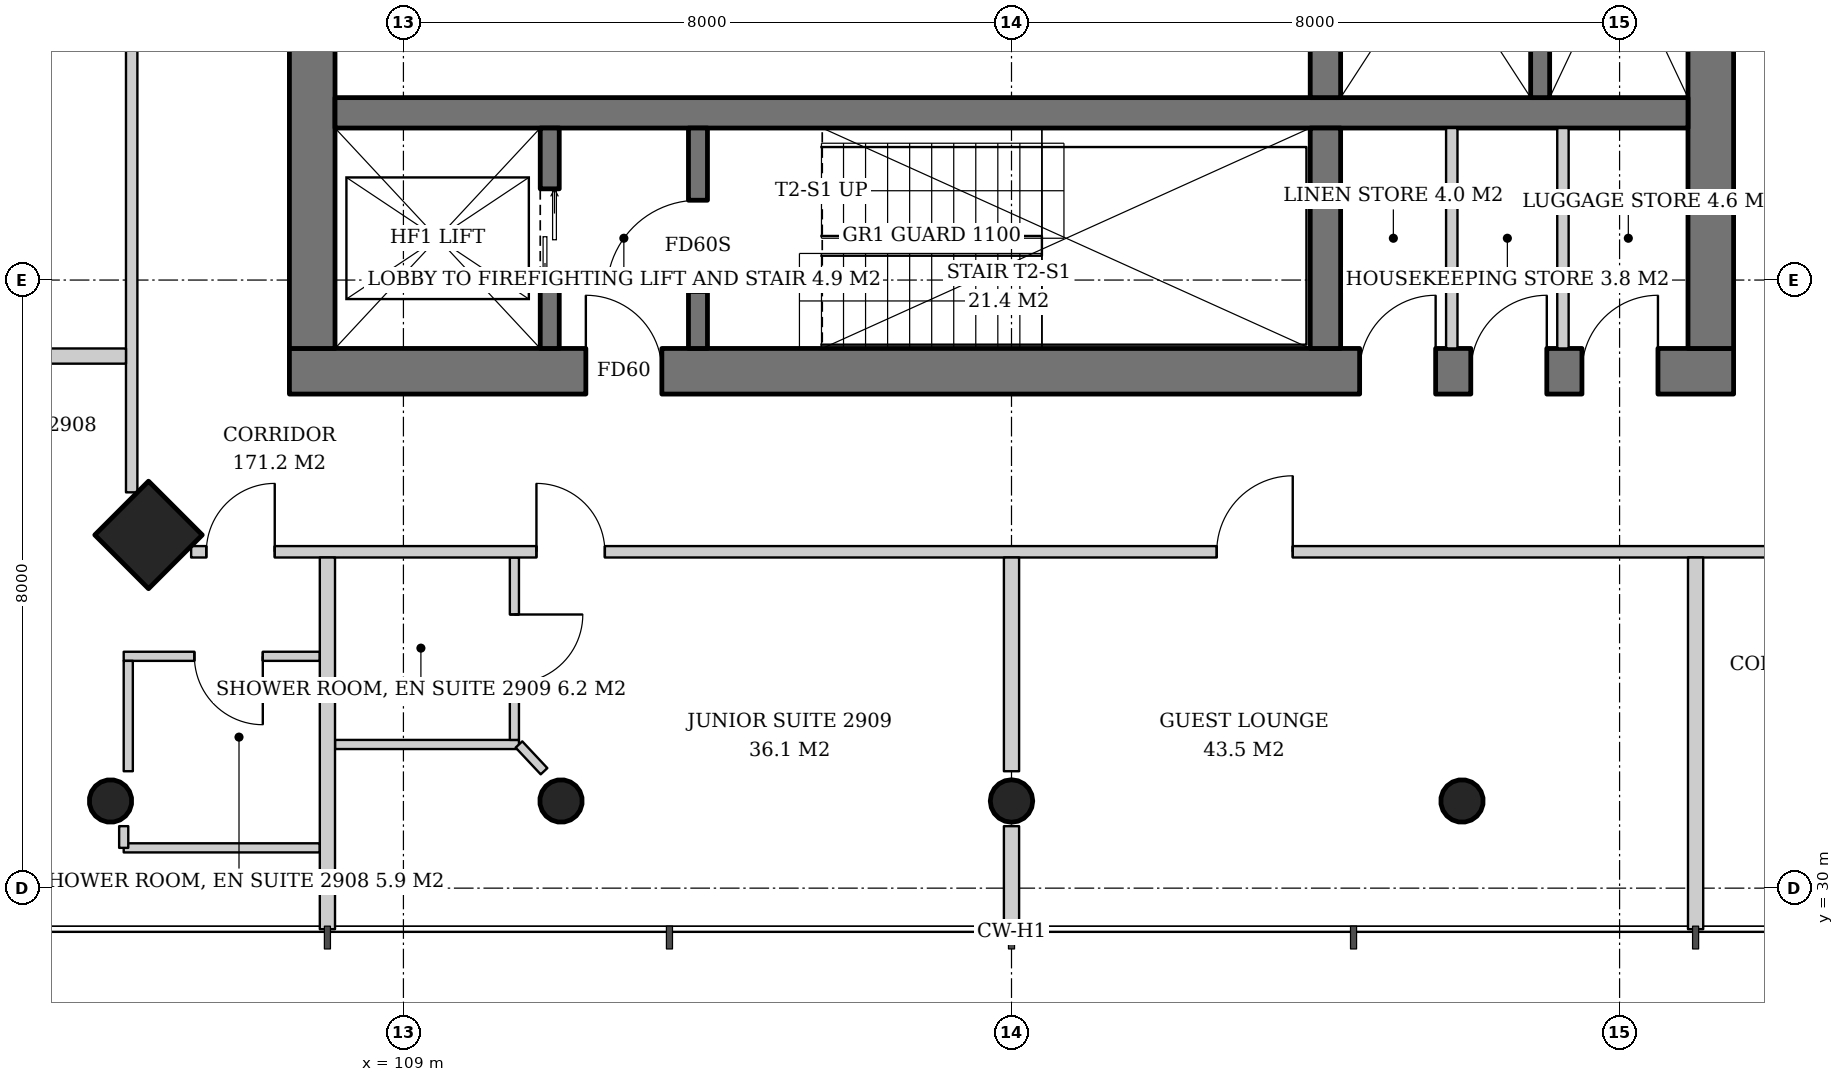
"""IFC4 building model, lengths in metres.
Left out: names, types, materials, properties, quantities, classifications, styles, units other than length and angle.
Written with IfcOpenShell. Run it as: python <this file> out.ifc"""

import sys

from ifc_helpers import new_model, si_unit, direction, frame, frame_2d, origin, origin_2d, place, context, subcontext, project, spatial, rectangle, hollow_circle, extrude, element, fill, save


model = new_model("IFC4")
c1 = context("Model", 3, precision=1e-05, world=origin(), true_north=direction((0.0, 1.0)))
c2 = subcontext(c1, "Body", "Model", "MODEL_VIEW")
j1 = project(units=[si_unit("LENGTHUNIT", "METRE"), si_unit("PLANEANGLEUNIT", "RADIAN")], contexts=[c1])
p1 = place(None, origin())
s1 = spatial("IfcSite", under=j1, at=p1, CompositionType="ELEMENT")
p2 = place(p1, origin())
s2 = spatial("IfcBuilding", under=s1, at=p2, CompositionType="ELEMENT")
p3 = place(p2, frame((0.0, 0.0, 116.0)))
s3 = spatial("IfcBuildingStorey", under=s2, at=p3, CompositionType="ELEMENT", Elevation=116.0)
p4 = place(p3, frame((105.595, 34.595, 0.0), z_axis=(0.043029647111, 0.043029647111, 0.998146732169), x_axis=(-0.707106781187, 0.707106781187, 0.0)))
e1 = element("IfcColumn", 1, at=p4, inside=s3, PredefinedType="COLUMN", context=c2, shape_type="SweptSolid", body=[
    extrude(rectangle(XDim=1.0, YDim=1.0, at=origin_2d()), origin(), (0.0, 0.0, 1.0), 3.807),
])
p5 = place(p3, frame((105.095, 31.095, 0.0), z_axis=(0.043029647111, 0.043029647111, 0.998146732169), x_axis=(-0.707106781187, 0.707106781187, 0.0)))
e2 = element("IfcColumn", 2, at=p5, inside=s3, PredefinedType="COLUMN", context=c2, shape_type="SweptSolid", body=[
    extrude(hollow_circle(Radius=0.28, WallThickness=0.02, at=origin_2d()), origin(), (0.0, 0.0, 1.0), 3.807),
])
p6 = place(p3, frame((111.047, 31.095, 0.0), z_axis=(0.021561848751, 0.043059525333, 0.998839808957), x_axis=(-0.894160516368, 0.44774654769, 0.0)))
e3 = element("IfcColumn", 3, at=p6, inside=s3, PredefinedType="COLUMN", context=c2, shape_type="SweptSolid", body=[
    extrude(hollow_circle(Radius=0.28, WallThickness=0.02, at=origin_2d()), origin(), (0.0, 0.0, 1.0), 3.804),
])
p7 = place(p3, frame((117.0, 31.095, 0.0), z_axis=(0.0, 0.043069538298, 0.999072076915), x_axis=(-1.0, 0.0, 0.0)))
e4 = element("IfcColumn", 4, at=p7, inside=s3, PredefinedType="COLUMN", context=c2, shape_type="SweptSolid", body=[
    extrude(hollow_circle(Radius=0.28, WallThickness=0.02, at=origin_2d()), origin(), (0.0, 0.0, 1.0), 3.803),
])
p8 = place(p3, frame((122.953, 31.095, 0.0), z_axis=(-0.021561848751, 0.043059525333, 0.998839808957), x_axis=(-0.894160516368, -0.44774654769, 0.0)))
e5 = element("IfcColumn", 5, at=p8, inside=s3, PredefinedType="COLUMN", context=c2, shape_type="SweptSolid", body=[
    extrude(hollow_circle(Radius=0.28, WallThickness=0.02, at=origin_2d()), origin(), (0.0, 0.0, 1.0), 3.804),
])
p9 = place(p3, frame((107.5, 36.8, 0.0), z_axis=(0.0, 0.0, 1.0), x_axis=(1.0, 0.0, 0.0)))
e6 = element("IfcWall", 6, at=p9, inside=s3, PredefinedType="SHEAR", context=c2, shape_type="SweptSolid", body=[
    extrude(rectangle(XDim=19.0, YDim=0.6, at=frame_2d((9.5, 0.0))), origin(), (0.0, 0.0, 1.0), 3.8),
])
p10 = place(p9, frame((3.9, 0.0, 0.0)))
e7 = element("IfcOpeningElement", 7, at=p10, cuts=e6, PredefinedType="OPENING", context=c2, shape_type="SweptSolid", body=[
    extrude(rectangle(XDim=1.0, YDim=2.1, at=frame_2d((0.5, 1.05))), frame((0.0, 0.31, 0.0), z_axis=(0.0, -1.0, 0.0), x_axis=(1.0, 0.0, 0.0)), (0.0, 0.0, 1.0), 0.62),
])
p11 = place(p9, frame((14.08, 0.0, 0.0)))
e8 = element("IfcOpeningElement", 8, at=p11, cuts=e6, PredefinedType="OPENING", context=c2, shape_type="SweptSolid", body=[
    extrude(rectangle(XDim=1.0, YDim=2.1, at=frame_2d((0.5, 1.05))), frame((0.0, 0.31, 0.0), z_axis=(0.0, -1.0, 0.0), x_axis=(1.0, 0.0, 0.0)), (0.0, 0.0, 1.0), 0.62),
])
p12 = place(p9, frame((15.542, 0.0, 0.0)))
e9 = element("IfcOpeningElement", 9, at=p12, cuts=e6, PredefinedType="OPENING", context=c2, shape_type="SweptSolid", body=[
    extrude(rectangle(XDim=1.0, YDim=2.1, at=frame_2d((0.5, 1.05))), frame((0.0, 0.31, 0.0), z_axis=(0.0, -1.0, 0.0), x_axis=(1.0, 0.0, 0.0)), (0.0, 0.0, 1.0), 0.62),
])
p13 = place(p9, frame((17.005, 0.0, 0.0)))
e10 = element("IfcOpeningElement", 10, at=p13, cuts=e6, PredefinedType="OPENING", context=c2, shape_type="SweptSolid", body=[
    extrude(rectangle(XDim=1.0, YDim=2.1, at=frame_2d((0.5, 1.05))), frame((0.0, 0.31, 0.0), z_axis=(0.0, -1.0, 0.0), x_axis=(1.0, 0.0, 0.0)), (0.0, 0.0, 1.0), 0.62),
])
p14 = place(p3, frame((107.8, 37.1, 0.0), z_axis=(0.0, 0.0, 1.0), x_axis=(0.0, 1.0, 0.0)))
e11 = element("IfcWall", 11, at=p14, inside=s3, PredefinedType="SHEAR", context=c2, shape_type="SweptSolid", body=[
    extrude(rectangle(XDim=17.8, YDim=0.6, at=frame_2d((8.9, 0.0))), origin(), (0.0, 0.0, 1.0), 3.8),
])
p15 = place(p14, frame((8.0, 0.0, 0.0)))
e12 = element("IfcOpeningElement", 12, at=p15, cuts=e11, PredefinedType="OPENING", context=c2, shape_type="SweptSolid", body=[
    extrude(rectangle(XDim=1.8, YDim=2.4, at=frame_2d((0.9, 1.2))), frame((0.0, 0.31, 0.0), z_axis=(0.0, -1.0, 0.0), x_axis=(1.0, 0.0, 0.0)), (0.0, 0.0, 1.0), 0.62),
])
p16 = place(p3, frame((126.2, 37.1, 0.0), z_axis=(0.0, 0.0, 1.0), x_axis=(0.0, 1.0, 0.0)))
e13 = element("IfcWall", 13, at=p16, inside=s3, PredefinedType="SHEAR", context=c2, shape_type="SweptSolid", body=[
    extrude(rectangle(XDim=17.8, YDim=0.6, at=frame_2d((8.9, 0.0))), origin(), (0.0, 0.0, 1.0), 3.8),
])
p17 = place(p16, frame((8.0, 0.0, 0.0)))
e14 = element("IfcOpeningElement", 14, at=p17, cuts=e13, PredefinedType="OPENING", context=c2, shape_type="SweptSolid", body=[
    extrude(rectangle(XDim=1.8, YDim=2.4, at=frame_2d((0.9, 1.2))), frame((0.0, 0.31, 0.0), z_axis=(0.0, -1.0, 0.0), x_axis=(1.0, 0.0, 0.0)), (0.0, 0.0, 1.0), 0.62),
])
p18 = place(p3, frame((108.1, 40.2, 0.0), z_axis=(0.0, 0.0, 1.0), x_axis=(1.0, 0.0, 0.0)))
e15 = element("IfcWall", 15, at=p18, inside=s3, PredefinedType="SHEAR", context=c2, shape_type="SweptSolid", body=[
    extrude(rectangle(XDim=17.8, YDim=0.4, at=frame_2d((8.9, 0.0))), origin(), (0.0, 0.0, 1.0), 3.8),
])
p19 = place(p3, frame((121.13, 37.1, 0.0), z_axis=(0.0, 0.0, 1.0), x_axis=(0.0, 1.0, 0.0)))
e16 = element("IfcWall", 16, at=p19, inside=s3, PredefinedType="SHEAR", context=c2, shape_type="SweptSolid", body=[
    extrude(rectangle(XDim=2.9, YDim=0.4, at=frame_2d((1.45, 0.0))), origin(), (0.0, 0.0, 1.0), 3.8),
])
p20 = place(p3, frame((121.13, 40.4, 0.0), z_axis=(0.0, 0.0, 1.0), x_axis=(0.0, 1.0, 0.0)))
e17 = element("IfcWall", 17, at=p20, inside=s3, PredefinedType="SHEAR", context=c2, shape_type="SweptSolid", body=[
    extrude(rectangle(XDim=11.2, YDim=0.4, at=frame_2d((5.6, 0.0))), origin(), (0.0, 0.0, 1.0), 3.8),
])
p21 = place(p3, frame((110.925, 37.1, 0.0), z_axis=(0.0, 0.0, 1.0), x_axis=(0.0, 1.0, 0.0)))
e18 = element("IfcWall", 18, at=p21, inside=s3, PredefinedType="SHEAR", context=c2, shape_type="SweptSolid", body=[
    extrude(rectangle(XDim=2.9, YDim=0.25, at=frame_2d((1.45, 0.0))), origin(), (0.0, 0.0, 1.0), 3.8),
])
p22 = place(p21, frame((0.8, 0.0, 0.0)))
e19 = element("IfcOpeningElement", 19, at=p22, cuts=e18, PredefinedType="OPENING", context=c2, shape_type="SweptSolid", body=[
    extrude(rectangle(XDim=1.3, YDim=2.2, at=frame_2d((0.65, 1.1))), frame((0.0, 0.135, 0.0), z_axis=(0.0, -1.0, 0.0), x_axis=(1.0, 0.0, 0.0)), (0.0, 0.0, 1.0), 0.27),
])
p23 = place(p3, frame((112.875, 37.1, 0.0), z_axis=(0.0, 0.0, 1.0), x_axis=(0.0, 1.0, 0.0)))
e20 = element("IfcWall", 20, at=p23, inside=s3, PredefinedType="SHEAR", context=c2, shape_type="SweptSolid", body=[
    extrude(rectangle(XDim=2.9, YDim=0.25, at=frame_2d((1.45, 0.0))), origin(), (0.0, 0.0, 1.0), 3.8),
])
p24 = place(p23, frame((0.75, 0.0, 0.0)))
e21 = element("IfcOpeningElement", 21, at=p24, cuts=e20, PredefinedType="OPENING", context=c2, shape_type="SweptSolid", body=[
    extrude(rectangle(XDim=1.2, YDim=2.1, at=frame_2d((0.6, 1.05))), frame((0.0, 0.135, 0.0), z_axis=(0.0, -1.0, 0.0), x_axis=(1.0, 0.0, 0.0)), (0.0, 0.0, 1.0), 0.27),
])
p25 = place(p3, frame((123.955, 44.25, 0.0), z_axis=(0.0, 0.0, 1.0), x_axis=(0.0, -1.0, 0.0)))
e22 = element("IfcWall", 22, at=p25, inside=s3, PredefinedType="SHEAR", context=c2, shape_type="SweptSolid", body=[
    extrude(rectangle(XDim=3.85, YDim=0.25, at=frame_2d((1.925, 0.0))), origin(), (0.0, 0.0, 1.0), 3.8),
])
for number, where, z_axis, x_axis in (
    (23, (122.792, 37.1, 0.0), (0.0, 0.0, 1.0), (0.0, 1.0, 0.0)),
    (24, (124.255, 37.1, 0.0), (0.0, 0.0, 1.0), (0.0, 1.0, 0.0)),
):
    element("IfcWall", number, at=place(p3, frame(where, z_axis=z_axis, x_axis=x_axis)), inside=s3, PredefinedType="SOLIDWALL", context=c2, shape_type="SweptSolid", body=[
        extrude(rectangle(XDim=2.9, YDim=0.15, at=frame_2d((1.45, 0.0))), origin(), (0.0, 0.0, 1.0), 3.6),
    ])
p26 = place(p3, frame((105.425, 56.793, 0.0), z_axis=(0.0, 0.0, 1.0), x_axis=(0.0, -1.0, 0.0)))
e25 = element("IfcWall", 25, at=p26, inside=s3, PredefinedType="PARTITIONING", context=c2, shape_type="SweptSolid", body=[
    extrude(rectangle(XDim=21.586, YDim=0.15, at=frame_2d((10.793, 0.0))), origin(), (0.0, 0.0, 1.0), 2.9),
])
p27 = place(p26, frame((0.2, 0.0, 0.0)))
e26 = element("IfcOpeningElement", 26, at=p27, cuts=e25, PredefinedType="OPENING", context=c2, shape_type="SweptSolid", body=[
    extrude(rectangle(XDim=0.9, YDim=2.1, at=frame_2d((0.45, 1.05))), frame((0.0, 0.085, 0.0), z_axis=(0.0, -1.0, 0.0), x_axis=(1.0, 0.0, 0.0)), (0.0, 0.0, 1.0), 0.17),
])
p28 = place(p26, frame((4.543, 0.0, 0.0)))
e27 = element("IfcOpeningElement", 27, at=p28, cuts=e25, PredefinedType="OPENING", context=c2, shape_type="SweptSolid", body=[
    extrude(rectangle(XDim=0.9, YDim=2.1, at=frame_2d((0.45, 1.05))), frame((0.0, 0.085, 0.0), z_axis=(0.0, -1.0, 0.0), x_axis=(1.0, 0.0, 0.0)), (0.0, 0.0, 1.0), 0.17),
])
p29 = place(p26, frame((13.543, 0.0, 0.0)))
e28 = element("IfcOpeningElement", 28, at=p29, cuts=e25, PredefinedType="OPENING", context=c2, shape_type="SweptSolid", body=[
    extrude(rectangle(XDim=0.9, YDim=2.1, at=frame_2d((0.45, 1.05))), frame((0.0, 0.085, 0.0), z_axis=(0.0, -1.0, 0.0), x_axis=(1.0, 0.0, 0.0)), (0.0, 0.0, 1.0), 0.17),
])
p30 = place(p3, frame((105.35, 37.0, 0.0), z_axis=(0.0, 0.0, 1.0), x_axis=(-1.0, 0.0, 0.0)))
e29 = element("IfcWall", 29, at=p30, inside=s3, PredefinedType="PARTITIONING", context=c2, shape_type="SweptSolid", body=[
    extrude(rectangle(XDim=4.89, YDim=0.2, at=frame_2d((2.445, 0.0))), origin(), (0.0, 0.0, 1.0), 3.2),
])
p31 = place(p3, frame((107.9, 33.05, 0.0), z_axis=(0.0, 0.0, 1.0), x_axis=(-1.0, 0.0, 0.0)))
e30 = element("IfcWall", 30, at=p31, inside=s3, PredefinedType="PARTITIONING", context=c2, shape_type="SweptSolid", body=[
    extrude(rectangle(XDim=2.58, YDim=0.12, at=frame_2d((1.29, 0.0))), origin(), (0.0, 0.0, 1.0), 2.9),
])
p32 = place(p31, frame((0.75, 0.0, 0.0)))
e31 = element("IfcOpeningElement", 31, at=p32, cuts=e30, PredefinedType="OPENING", context=c2, shape_type="SweptSolid", body=[
    extrude(rectangle(XDim=0.9, YDim=2.1, at=frame_2d((0.45, 1.05))), frame((0.0, 0.07, 0.0), z_axis=(0.0, -1.0, 0.0), x_axis=(1.0, 0.0, 0.0)), (0.0, 0.0, 1.0), 0.14),
])
p33 = place(p3, frame((107.9, 30.53, 0.0), z_axis=(0.0, 0.0, 1.0), x_axis=(-1.0, 0.0, 0.0)))
e32 = element("IfcWall", 32, at=p33, inside=s3, PredefinedType="PARTITIONING", context=c2, shape_type="SweptSolid", body=[
    extrude(rectangle(XDim=2.58, YDim=0.12, at=frame_2d((1.29, 0.0))), origin(), (0.0, 0.0, 1.0), 3.6),
])
p34 = place(p3, frame((105.38, 32.99, 0.0), z_axis=(0.0, 0.0, 1.0), x_axis=(0.0, -1.0, 0.0)))
e33 = element("IfcWall", 33, at=p34, inside=s3, PredefinedType="PARTITIONING", context=c2, shape_type="SweptSolid", body=[
    extrude(rectangle(XDim=1.452, YDim=0.12, at=frame_2d((0.726, 0.0))), origin(), (0.0, 0.0, 1.0), 3.2),
])
p35 = place(p3, frame((108.1, 31.89, 0.0), z_axis=(0.0, 0.0, 1.0), x_axis=(1.0, 0.0, 0.0)))
e34 = element("IfcWall", 34, at=p35, inside=s3, PredefinedType="PARTITIONING", context=c2, shape_type="SweptSolid", body=[
    extrude(rectangle(XDim=2.42, YDim=0.12, at=frame_2d((1.21, 0.0))), origin(), (0.0, 0.0, 1.0), 3.6),
])
p36 = place(p3, frame((110.46, 34.35, 0.0), z_axis=(0.0, 0.0, 1.0), x_axis=(0.0, -1.0, 0.0)))
e35 = element("IfcWall", 35, at=p36, inside=s3, PredefinedType="PARTITIONING", context=c2, shape_type="SweptSolid", body=[
    extrude(rectangle(XDim=2.4, YDim=0.12, at=frame_2d((1.2, 0.0))), origin(), (0.0, 0.0, 1.0), 3.6),
])
p37 = place(p36, frame((0.75, 0.0, 0.0)))
e36 = element("IfcOpeningElement", 36, at=p37, cuts=e35, PredefinedType="OPENING", context=c2, shape_type="SweptSolid", body=[
    extrude(rectangle(XDim=0.9, YDim=2.1, at=frame_2d((0.45, 1.05))), frame((0.0, 0.07, 0.0), z_axis=(0.0, -1.0, 0.0), x_axis=(1.0, 0.0, 0.0)), (0.0, 0.0, 1.0), 0.14),
])
p38 = place(p3, frame((106.207, 34.425, 0.0), z_axis=(0.0, 0.0, 1.0), x_axis=(1.0, 0.0, 0.0)))
e37 = element("IfcWall", 37, at=p38, inside=s3, PredefinedType="PARTITIONING", context=c2, shape_type="SweptSolid", body=[
    extrude(rectangle(XDim=21.586, YDim=0.15, at=frame_2d((10.793, 0.0))), origin(), (0.0, 0.0, 1.0), 2.9),
])
p39 = place(p38, frame((0.2, 0.0, 0.0)))
e38 = element("IfcOpeningElement", 38, at=p39, cuts=e37, PredefinedType="OPENING", context=c2, shape_type="SweptSolid", body=[
    extrude(rectangle(XDim=0.9, YDim=2.1, at=frame_2d((0.45, 1.05))), frame((0.0, 0.085, 0.0), z_axis=(0.0, -1.0, 0.0), x_axis=(1.0, 0.0, 0.0)), (0.0, 0.0, 1.0), 0.17),
])
p40 = place(p38, frame((4.543, 0.0, 0.0)))
e39 = element("IfcOpeningElement", 39, at=p40, cuts=e37, PredefinedType="OPENING", context=c2, shape_type="SweptSolid", body=[
    extrude(rectangle(XDim=0.9, YDim=2.1, at=frame_2d((0.45, 1.05))), frame((0.0, 0.085, 0.0), z_axis=(0.0, -1.0, 0.0), x_axis=(1.0, 0.0, 0.0)), (0.0, 0.0, 1.0), 0.17),
])
p41 = place(p38, frame((13.493, 0.0, 0.0)))
e40 = element("IfcOpeningElement", 40, at=p41, cuts=e37, PredefinedType="OPENING", context=c2, shape_type="SweptSolid", body=[
    extrude(rectangle(XDim=1.0, YDim=2.1, at=frame_2d((0.5, 1.05))), frame((0.0, 0.085, 0.0), z_axis=(0.0, -1.0, 0.0), x_axis=(1.0, 0.0, 0.0)), (0.0, 0.0, 1.0), 0.17),
])
p42 = place(p3, frame((108.0, 34.35, 0.0), z_axis=(0.0, 0.0, 1.0), x_axis=(0.0, -1.0, 0.0)))
e41 = element("IfcWall", 41, at=p42, inside=s3, PredefinedType="PARTITIONING", context=c2, shape_type="SweptSolid", body=[
    extrude(rectangle(XDim=4.89, YDim=0.2, at=frame_2d((2.445, 0.0))), origin(), (0.0, 0.0, 1.0), 2.9),
])
p43 = place(p3, frame((117.0, 34.35, 0.0), z_axis=(0.0, 0.0, 1.0), x_axis=(0.0, -1.0, 0.0)))
e42 = element("IfcWall", 42, at=p43, inside=s3, PredefinedType="PARTITIONING", context=c2, shape_type="SweptSolid", body=[
    extrude(rectangle(XDim=2.812, YDim=0.2, at=frame_2d((1.406, 0.0))), origin(), (0.0, 0.0, 1.0), 3.6),
])
p44 = place(p3, frame((117.0, 30.815, 0.0), z_axis=(0.0, 0.0, 1.0), x_axis=(0.0, -1.0, 0.0)))
e43 = element("IfcWall", 43, at=p44, inside=s3, PredefinedType="PARTITIONING", context=c2, shape_type="SweptSolid", body=[
    extrude(rectangle(XDim=1.355, YDim=0.2, at=frame_2d((0.678, 0.0))), origin(), (0.0, 0.0, 1.0), 3.6),
])
p45 = place(p3, frame((126.0, 34.35, 0.0), z_axis=(0.0, 0.0, 1.0), x_axis=(0.0, -1.0, 0.0)))
e44 = element("IfcWall", 44, at=p45, inside=s3, PredefinedType="PARTITIONING", context=c2, shape_type="SweptSolid", body=[
    extrude(rectangle(XDim=4.89, YDim=0.2, at=frame_2d((2.445, 0.0))), origin(), (0.0, 0.0, 1.0), 3.2),
])
p46 = place(p3, frame((105.32, 30.53, 0.0), z_axis=(0.0, 0.0, 1.0), x_axis=(0.0, 1.0, 0.0)))
e45 = element("IfcWall", 45, at=p46, inside=s3, PredefinedType="PARTITIONING", context=c2, shape_type="SweptSolid", body=[
    extrude(rectangle(XDim=0.285, YDim=0.12, at=frame_2d((0.143, 0.0))), origin(), (0.0, 0.0, 1.0), 3.6),
])
p47 = place(p3, frame((110.52, 31.89, 0.0), z_axis=(0.0, 0.0, 1.0), x_axis=(0.683957968966, -0.729521416195, 0.0)))
e46 = element("IfcWall", 46, at=p47, inside=s3, PredefinedType="PARTITIONING", context=c2, shape_type="SweptSolid", body=[
    extrude(rectangle(XDim=0.482, YDim=0.12, at=frame_2d((0.241, 0.0))), origin(), (0.0, 0.0, 1.0), 3.6),
])
p48 = place(p22, origin())
e47 = element("IfcDoor", 47, at=p48, inside=s3, OperationType="DOUBLE_DOOR_SLIDING", PredefinedType="DOOR", context=c2, shape_type="SweptSolid", body=[
    extrude(rectangle(XDim=1.3, YDim=2.2, at=frame_2d((0.65, 1.1))), frame((0.0, 0.025, 0.0), z_axis=(0.0, -1.0, 0.0), x_axis=(1.0, 0.0, 0.0)), (0.0, 0.0, 1.0), 0.05),
])
fill(e19, e47)
p49 = place(p24, origin())
e48 = element("IfcDoor", 48, at=p49, inside=s3, OperationType="SINGLE_SWING_LEFT", PredefinedType="DOOR", context=c2, shape_type="SweptSolid", body=[
    extrude(rectangle(XDim=1.2, YDim=2.1, at=frame_2d((0.6, 1.05))), frame((0.0, 0.025, 0.0), z_axis=(0.0, -1.0, 0.0), x_axis=(1.0, 0.0, 0.0)), (0.0, 0.0, 1.0), 0.05),
])
fill(e21, e48)
p50 = place(p10, origin())
e49 = element("IfcDoor", 49, at=p50, inside=s3, OperationType="SINGLE_SWING_LEFT", PredefinedType="DOOR", context=c2, shape_type="SweptSolid", body=[
    extrude(rectangle(XDim=1.0, YDim=2.1, at=frame_2d((0.5, 1.05))), frame((0.0, 0.025, 0.0), z_axis=(0.0, -1.0, 0.0), x_axis=(1.0, 0.0, 0.0)), (0.0, 0.0, 1.0), 0.05),
])
fill(e7, e49)
p51 = place(p11, origin())
e50 = element("IfcDoor", 50, at=p51, inside=s3, OperationType="SINGLE_SWING_RIGHT", PredefinedType="DOOR", context=c2, shape_type="SweptSolid", body=[
    extrude(rectangle(XDim=1.0, YDim=2.1, at=frame_2d((0.5, 1.05))), frame((0.0, 0.29, 0.0), z_axis=(0.0, -1.0, 0.0), x_axis=(1.0, 0.0, 0.0)), (0.0, 0.0, 1.0), 0.05),
])
fill(e8, e50)
p52 = place(p12, origin())
e51 = element("IfcDoor", 51, at=p52, inside=s3, OperationType="SINGLE_SWING_RIGHT", PredefinedType="DOOR", context=c2, shape_type="SweptSolid", body=[
    extrude(rectangle(XDim=1.0, YDim=2.1, at=frame_2d((0.5, 1.05))), frame((0.0, 0.29, 0.0), z_axis=(0.0, -1.0, 0.0), x_axis=(1.0, 0.0, 0.0)), (0.0, 0.0, 1.0), 0.05),
])
fill(e9, e51)
p53 = place(p13, origin())
e52 = element("IfcDoor", 52, at=p53, inside=s3, OperationType="SINGLE_SWING_RIGHT", PredefinedType="DOOR", context=c2, shape_type="SweptSolid", body=[
    extrude(rectangle(XDim=1.0, YDim=2.1, at=frame_2d((0.5, 1.05))), frame((0.0, 0.29, 0.0), z_axis=(0.0, -1.0, 0.0), x_axis=(1.0, 0.0, 0.0)), (0.0, 0.0, 1.0), 0.05),
])
fill(e10, e52)
p54 = place(p32, origin())
e53 = element("IfcDoor", 53, at=p54, inside=s3, OperationType="SINGLE_SWING_LEFT", PredefinedType="DOOR", context=c2, shape_type="SweptSolid", body=[
    extrude(rectangle(XDim=0.9, YDim=2.1, at=frame_2d((0.45, 1.05))), frame((0.0, 0.025, 0.0), z_axis=(0.0, -1.0, 0.0), x_axis=(1.0, 0.0, 0.0)), (0.0, 0.0, 1.0), 0.05),
])
fill(e31, e53)
p55 = place(p37, origin())
e54 = element("IfcDoor", 54, at=p55, inside=s3, OperationType="SINGLE_SWING_LEFT", PredefinedType="DOOR", context=c2, shape_type="SweptSolid", body=[
    extrude(rectangle(XDim=0.9, YDim=2.1, at=frame_2d((0.45, 1.05))), frame((0.0, 0.025, 0.0), z_axis=(0.0, -1.0, 0.0), x_axis=(1.0, 0.0, 0.0)), (0.0, 0.0, 1.0), 0.05),
])
fill(e36, e54)
p56 = place(p39, origin())
e55 = element("IfcDoor", 55, at=p56, inside=s3, OperationType="SINGLE_SWING_RIGHT", PredefinedType="DOOR", context=c2, shape_type="SweptSolid", body=[
    extrude(rectangle(XDim=0.9, YDim=2.1, at=frame_2d((0.45, 1.05))), frame((0.0, 0.025, 0.0), z_axis=(0.0, -1.0, 0.0), x_axis=(1.0, 0.0, 0.0)), (0.0, 0.0, 1.0), 0.05),
])
fill(e38, e55)
p57 = place(p40, origin())
e56 = element("IfcDoor", 56, at=p57, inside=s3, OperationType="SINGLE_SWING_LEFT", PredefinedType="DOOR", context=c2, shape_type="SweptSolid", body=[
    extrude(rectangle(XDim=0.9, YDim=2.1, at=frame_2d((0.45, 1.05))), frame((0.0, 0.025, 0.0), z_axis=(0.0, -1.0, 0.0), x_axis=(1.0, 0.0, 0.0)), (0.0, 0.0, 1.0), 0.05),
])
fill(e39, e56)
p58 = place(p41, origin())
e57 = element("IfcDoor", 57, at=p58, inside=s3, OperationType="SINGLE_SWING_RIGHT", PredefinedType="DOOR", context=c2, shape_type="SweptSolid", body=[
    extrude(rectangle(XDim=1.0, YDim=2.1, at=frame_2d((0.5, 1.05))), frame((0.0, 0.025, 0.0), z_axis=(0.0, -1.0, 0.0), x_axis=(1.0, 0.0, 0.0)), (0.0, 0.0, 1.0), 0.05),
])
fill(e40, e57)
save(model, sys.argv[1])
